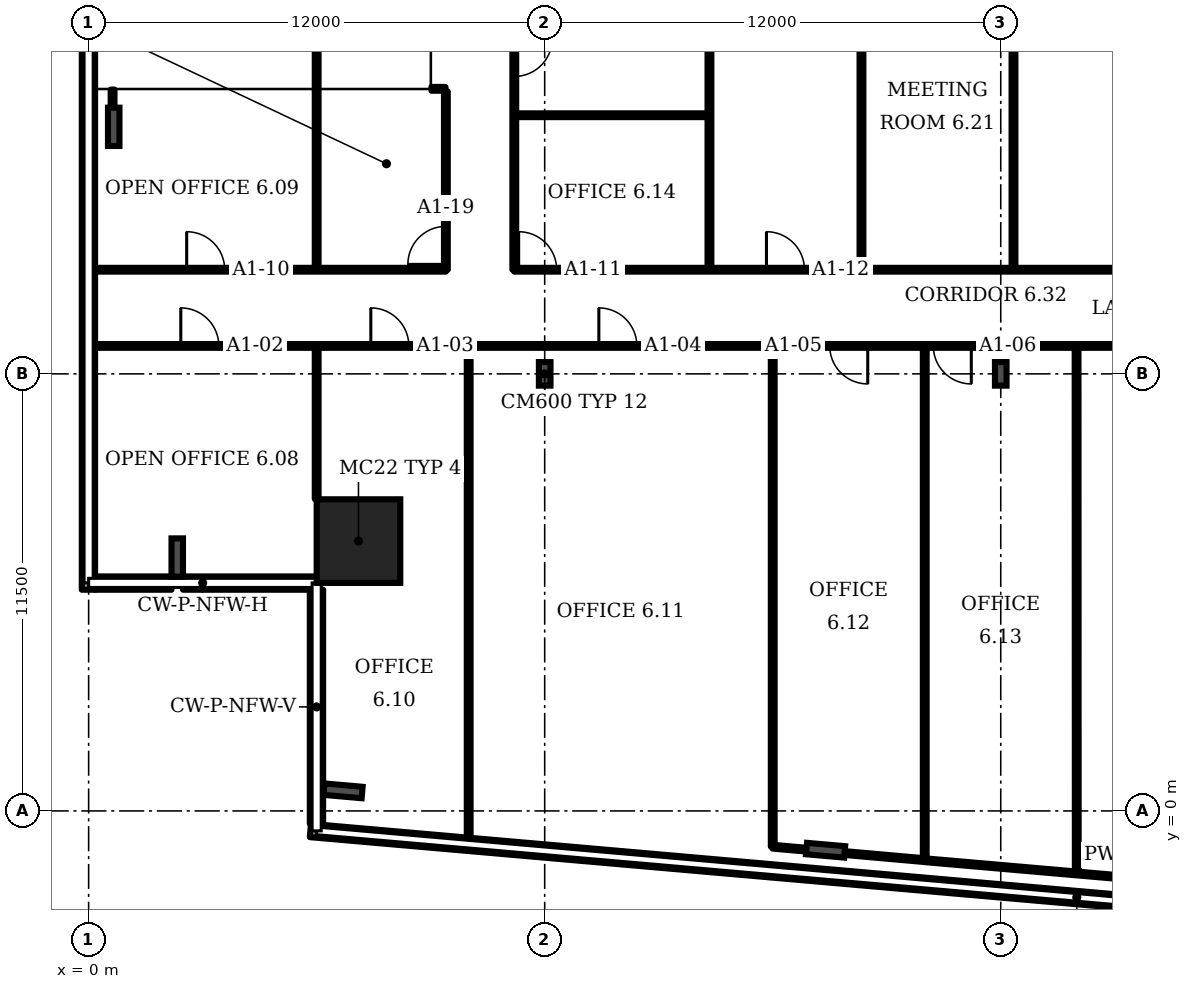
"""IFC4 building model, lengths in metres.
Left out: names, types, materials, properties, quantities, classifications, styles, units other than length and angle.
Written with IfcOpenShell. Run it as: python <this file> out.ifc"""

import sys

from ifc_helpers import new_model, si_unit, direction, frame, frame_2d, origin, origin_2d, place, context, subcontext, project, spatial, rectangle, i_section, extrude, element, fill, save


model = new_model("IFC4")
c1 = context("Model", 3, precision=1e-05, world=origin(), true_north=direction((0.0, 1.0)))
c2 = subcontext(c1, "Body", "Model", "MODEL_VIEW")
j1 = project(units=[si_unit("LENGTHUNIT", "METRE"), si_unit("PLANEANGLEUNIT", "RADIAN")], contexts=[c1])
p1 = place(None, origin())
s1 = spatial("IfcSite", under=j1, at=p1, CompositionType="ELEMENT")
p2 = place(p1, origin())
s2 = spatial("IfcBuilding", under=s1, at=p2, CompositionType="ELEMENT")
p3 = place(p2, frame((0.0, 0.0, 41.5)))
s3 = spatial("IfcBuildingStorey", under=s2, at=p3, CompositionType="ELEMENT", Elevation=41.5)
p4 = place(p3, frame((7.1, 7.1, 0.0), z_axis=(0.0, 0.0, 1.0), x_axis=(1.0, 0.0, 0.0)))
e1 = element("IfcColumn", 1, at=p4, inside=s3, PredefinedType="COLUMN", context=c2, shape_type="SweptSolid", body=[
    extrude(rectangle(XDim=2.2, YDim=2.2, at=origin_2d()), origin(), (0.0, 0.0, 1.0), 3.6),
])
for number, where, z_axis, x_axis in (
    (2, (6.694, 0.529, 0.0), (0.0, 0.0, 1.0), (-0.087, -0.996, 0.0)),
    (3, (19.391, -1.034, 0.0), (0.0, 0.0, 1.0), (-0.087, -0.996, 0.0)),
    (4, (0.66, 18.0, 0.0), (0.0, 0.0, 1.0), (-1.0, 0.0, 0.0)),
    (5, (2.332, 6.667, 0.0), (0.0, 0.0, 1.0), (-1.0, 0.0, 0.0)),
):
    element("IfcColumn", number, at=place(p3, frame(where, z_axis=z_axis, x_axis=x_axis)), inside=s3, PredefinedType="COLUMN", context=c2, shape_type="SweptSolid", body=[
        extrude(i_section(OverallWidth=0.302, OverallDepth=1.008, WebThickness=0.021, FlangeThickness=0.04, FilletRadius=0.03, at=origin_2d()), origin(), (0.0, 0.0, 1.0), 3.6),
    ])
for number, where, z_axis, x_axis in (
    (6, (12.0, 11.5, 0.0), (0.0, 0.0, 1.0), (1.0, 0.0, 0.0)),
    (7, (24.0, 11.5, 0.0), (0.0, 0.0, 1.0), (1.0, 0.0, 0.0)),
):
    element("IfcColumn", number, at=place(p3, frame(where, z_axis=z_axis, x_axis=x_axis)), inside=s3, PredefinedType="COLUMN", context=c2, shape_type="SweptSolid", body=[
        extrude(i_section(OverallWidth=0.305, OverallDepth=0.62, WebThickness=0.021, FlangeThickness=0.04, FilletRadius=0.027, at=origin_2d()), origin(), (0.0, 0.0, 1.0), 3.6),
    ])
p5 = place(p3, frame((5.835, -0.516, 0.0), z_axis=(0.0, 0.0, 1.0), x_axis=(0.996195, -0.087152, 0.0)))
e8 = element("IfcWall", 8, at=p5, inside=s3, PredefinedType="SOLIDWALL", context=c2, shape_type="SweptSolid", body=[
    extrude(rectangle(XDim=40.333, YDim=0.35, at=frame_2d((20.167, 0.0))), origin(), (0.0, 0.0, 1.0), 1.0),
])
p6 = place(p3, frame((-0.005, 41.83, 0.0), z_axis=(0.0, 0.0, 1.0), x_axis=(0.0, -1.0, 0.0)))
e9 = element("IfcWall", 9, at=p6, inside=s3, PredefinedType="SOLIDWALL", context=c2, shape_type="SweptSolid", body=[
    extrude(rectangle(XDim=36.01, YDim=0.35, at=frame_2d((18.005, 0.0))), origin(), (0.0, 0.0, 1.0), 1.0),
])
p7 = place(p3, frame((0.17, 5.995, 0.0), z_axis=(0.0, 0.0, 1.0), x_axis=(1.0, 0.0, 0.0)))
e10 = element("IfcWall", 10, at=p7, inside=s3, PredefinedType="SOLIDWALL", context=c2, shape_type="SweptSolid", body=[
    extrude(rectangle(XDim=2.011, YDim=0.35, at=frame_2d((1.005, 0.0))), origin(), (0.0, 0.0, 1.0), 1.0),
])
p8 = place(p3, frame((2.483, 5.995, 0.0), z_axis=(0.0, 0.0, 1.0), x_axis=(1.0, 0.0, 0.0)))
e11 = element("IfcWall", 11, at=p8, inside=s3, PredefinedType="SOLIDWALL", context=c2, shape_type="SweptSolid", body=[
    extrude(rectangle(XDim=3.517, YDim=0.35, at=frame_2d((1.759, 0.0))), origin(), (0.0, 0.0, 1.0), 1.0),
])
p9 = place(p3, frame((5.995, 5.82, 0.0), z_axis=(0.0, 0.0, 1.0), x_axis=(0.0, -1.0, 0.0)))
e12 = element("IfcWall", 12, at=p9, inside=s3, PredefinedType="SOLIDWALL", context=c2, shape_type="SweptSolid", body=[
    extrude(rectangle(XDim=6.161, YDim=0.35, at=frame_2d((3.081, 0.0))), origin(), (0.0, 0.0, 1.0), 1.0),
])
p10 = place(p3, frame((0.02, 12.235, 0.0), z_axis=(0.0, 0.0, 1.0), x_axis=(1.0, 0.0, 0.0)))
e13 = element("IfcWall", 13, at=p10, inside=s3, PredefinedType="PARTITIONING", context=c2, shape_type="SweptSolid", body=[
    extrude(rectangle(XDim=38.46, YDim=0.1, at=frame_2d((19.23, 0.0))), origin(), (0.0, 0.0, 1.0), 3.2),
])
p11 = place(p10, frame((2.405, 0.0, 0.0)))
e14 = element("IfcOpeningElement", 14, at=p11, cuts=e13, PredefinedType="OPENING", context=c2, shape_type="SweptSolid", body=[
    extrude(rectangle(XDim=1.0, YDim=2.1, at=frame_2d((0.5, 1.05))), frame((0.0, 0.06, 0.0), z_axis=(0.0, -1.0, 0.0), x_axis=(1.0, 0.0, 0.0)), (0.0, 0.0, 1.0), 0.12),
])
p12 = place(p10, frame((7.405, 0.0, 0.0)))
e15 = element("IfcOpeningElement", 15, at=p12, cuts=e13, PredefinedType="OPENING", context=c2, shape_type="SweptSolid", body=[
    extrude(rectangle(XDim=1.0, YDim=2.1, at=frame_2d((0.5, 1.05))), frame((0.0, 0.06, 0.0), z_axis=(0.0, -1.0, 0.0), x_axis=(1.0, 0.0, 0.0)), (0.0, 0.0, 1.0), 0.12),
])
p13 = place(p10, frame((13.405, 0.0, 0.0)))
e16 = element("IfcOpeningElement", 16, at=p13, cuts=e13, PredefinedType="OPENING", context=c2, shape_type="SweptSolid", body=[
    extrude(rectangle(XDim=1.0, YDim=2.1, at=frame_2d((0.5, 1.05))), frame((0.0, 0.06, 0.0), z_axis=(0.0, -1.0, 0.0), x_axis=(1.0, 0.0, 0.0)), (0.0, 0.0, 1.0), 0.12),
])
p14 = place(p10, frame((19.48, 0.0, 0.0)))
e17 = element("IfcOpeningElement", 17, at=p14, cuts=e13, PredefinedType="OPENING", context=c2, shape_type="SweptSolid", body=[
    extrude(rectangle(XDim=1.0, YDim=2.1, at=frame_2d((0.5, 1.05))), frame((0.0, 0.06, 0.0), z_axis=(0.0, -1.0, 0.0), x_axis=(1.0, 0.0, 0.0)), (0.0, 0.0, 1.0), 0.12),
])
p15 = place(p10, frame((22.205, 0.0, 0.0)))
e18 = element("IfcOpeningElement", 18, at=p15, cuts=e13, PredefinedType="OPENING", context=c2, shape_type="SweptSolid", body=[
    extrude(rectangle(XDim=1.0, YDim=2.1, at=frame_2d((0.5, 1.05))), frame((0.0, 0.06, 0.0), z_axis=(0.0, -1.0, 0.0), x_axis=(1.0, 0.0, 0.0)), (0.0, 0.0, 1.0), 0.12),
])
p16 = place(p10, frame((34.2, 0.0, 0.0)))
e19 = element("IfcOpeningElement", 19, at=p16, cuts=e13, PredefinedType="OPENING", context=c2, shape_type="SweptSolid", body=[
    extrude(rectangle(XDim=1.0, YDim=2.1, at=frame_2d((0.5, 1.05))), frame((0.0, 0.06, 0.0), z_axis=(0.0, -1.0, 0.0), x_axis=(1.0, 0.0, 0.0)), (0.0, 0.0, 1.0), 0.12),
])
p17 = place(p3, frame((0.02, 14.24, 0.0), z_axis=(0.0, 0.0, 1.0), x_axis=(1.0, 0.0, 0.0)))
e20 = element("IfcWall", 20, at=p17, inside=s3, PredefinedType="PARTITIONING", context=c2, shape_type="SweptSolid", body=[
    extrude(rectangle(XDim=9.38, YDim=0.1, at=frame_2d((4.69, 0.0))), origin(), (0.0, 0.0, 1.0), 3.2),
])
p18 = place(p17, frame((2.56, 0.0, 0.0)))
e21 = element("IfcOpeningElement", 21, at=p18, cuts=e20, PredefinedType="OPENING", context=c2, shape_type="SweptSolid", body=[
    extrude(rectangle(XDim=1.0, YDim=2.1, at=frame_2d((0.5, 1.05))), frame((0.0, 0.06, 0.0), z_axis=(0.0, -1.0, 0.0), x_axis=(1.0, 0.0, 0.0)), (0.0, 0.0, 1.0), 0.12),
])
p19 = place(p3, frame((0.63, 17.5, 0.0), z_axis=(0.0, 0.0, 1.0), x_axis=(0.0, 1.0, 0.0)))
e22 = element("IfcWall", 22, at=p19, inside=s3, PredefinedType="PARTITIONING", context=c2, shape_type="SweptSolid", body=[
    extrude(rectangle(XDim=1.48, YDim=0.1, at=frame_2d((0.74, 0.0))), origin(), (0.0, 0.0, 1.0), 2.58),
])
p20 = place(p3, frame((6.0, 8.21, 0.0), z_axis=(0.0, 0.0, 1.0), x_axis=(0.0, 1.0, 0.0)))
e23 = element("IfcWall", 23, at=p20, inside=s3, PredefinedType="PARTITIONING", context=c2, shape_type="SweptSolid", body=[
    extrude(rectangle(XDim=4.025, YDim=0.1, at=frame_2d((2.013, 0.0))), origin(), (0.0, 0.0, 1.0), 3.2),
])
p21 = place(p3, frame((6.0, 14.24, 0.0), z_axis=(0.0, 0.0, 1.0), x_axis=(0.0, 1.0, 0.0)))
e24 = element("IfcWall", 24, at=p21, inside=s3, PredefinedType="PARTITIONING", context=c2, shape_type="SweptSolid", body=[
    extrude(rectangle(XDim=6.085, YDim=0.1, at=frame_2d((3.042, 0.0))), origin(), (0.0, 0.0, 1.0), 3.2),
])
p22 = place(p3, frame((9.02, 19.0, 0.0), z_axis=(0.0, 0.0, 1.0), x_axis=(1.0, 0.0, 0.0)))
e25 = element("IfcWall", 25, at=p22, inside=s3, PredefinedType="PARTITIONING", context=c2, shape_type="SweptSolid", body=[
    extrude(rectangle(XDim=0.37, YDim=0.1, at=frame_2d((0.185, 0.0))), origin(), (0.0, 0.0, 1.0), 3.2),
])
p23 = place(p3, frame((9.4, 14.24, 0.0), z_axis=(0.0, 0.0, 1.0), x_axis=(0.0, 1.0, 0.0)))
e26 = element("IfcWall", 26, at=p23, inside=s3, PredefinedType="PARTITIONING", context=c2, shape_type="SweptSolid", body=[
    extrude(rectangle(XDim=4.69, YDim=0.1, at=frame_2d((2.345, 0.0))), origin(), (0.0, 0.0, 1.0), 3.2),
])
p24 = place(p23, frame((0.14, 0.0, 0.0)))
e27 = element("IfcOpeningElement", 27, at=p24, cuts=e26, PredefinedType="OPENING", context=c2, shape_type="SweptSolid", body=[
    extrude(rectangle(XDim=1.0, YDim=2.1, at=frame_2d((0.5, 1.05))), frame((0.0, 0.06, 0.0), z_axis=(0.0, -1.0, 0.0), x_axis=(1.0, 0.0, 0.0)), (0.0, 0.0, 1.0), 0.12),
])
p25 = place(p3, frame((10.0, -0.855, 0.0), z_axis=(0.0, 0.0, 1.0), x_axis=(0.0, 1.0, 0.0)))
e28 = element("IfcWall", 28, at=p25, inside=s3, PredefinedType="PARTITIONING", context=c2, shape_type="SweptSolid", body=[
    extrude(rectangle(XDim=13.09, YDim=0.1, at=frame_2d((6.545, 0.0))), origin(), (0.0, 0.0, 1.0), 3.2),
])
p26 = place(p3, frame((11.2, 14.24, 0.0), z_axis=(0.0, 0.0, 1.0), x_axis=(0.0, 1.0, 0.0)))
e29 = element("IfcWall", 29, at=p26, inside=s3, PredefinedType="PARTITIONING", context=c2, shape_type="SweptSolid", body=[
    extrude(rectangle(XDim=7.11, YDim=0.1, at=frame_2d((3.555, 0.0))), origin(), (0.0, 0.0, 1.0), 3.2),
])
p27 = place(p26, frame((5.085, 0.0, 0.0)))
e30 = element("IfcOpeningElement", 30, at=p27, cuts=e29, PredefinedType="OPENING", context=c2, shape_type="SweptSolid", body=[
    extrude(rectangle(XDim=1.0, YDim=2.1, at=frame_2d((0.5, 1.05))), frame((0.0, 0.06, 0.0), z_axis=(0.0, -1.0, 0.0), x_axis=(1.0, 0.0, 0.0)), (0.0, 0.0, 1.0), 0.12),
])
p28 = place(p3, frame((11.2, 14.24, 0.0), z_axis=(0.0, 0.0, 1.0), x_axis=(1.0, 0.0, 0.0)))
e31 = element("IfcWall", 31, at=p28, inside=s3, PredefinedType="PARTITIONING", context=c2, shape_type="SweptSolid", body=[
    extrude(rectangle(XDim=51.635, YDim=0.1, at=frame_2d((25.817, 0.0))), origin(), (0.0, 0.0, 1.0), 3.2),
])
p29 = place(p28, frame((0.115, 0.0, 0.0)))
e32 = element("IfcOpeningElement", 32, at=p29, cuts=e31, PredefinedType="OPENING", context=c2, shape_type="SweptSolid", body=[
    extrude(rectangle(XDim=1.0, YDim=2.1, at=frame_2d((0.5, 1.05))), frame((0.0, 0.06, 0.0), z_axis=(0.0, -1.0, 0.0), x_axis=(1.0, 0.0, 0.0)), (0.0, 0.0, 1.0), 0.12),
])
p30 = place(p28, frame((6.635, 0.0, 0.0)))
e33 = element("IfcOpeningElement", 33, at=p30, cuts=e31, PredefinedType="OPENING", context=c2, shape_type="SweptSolid", body=[
    extrude(rectangle(XDim=1.0, YDim=2.1, at=frame_2d((0.5, 1.05))), frame((0.0, 0.06, 0.0), z_axis=(0.0, -1.0, 0.0), x_axis=(1.0, 0.0, 0.0)), (0.0, 0.0, 1.0), 0.12),
])
p31 = place(p28, frame((22.7, 0.0, 0.0)))
e34 = element("IfcOpeningElement", 34, at=p31, cuts=e31, PredefinedType="OPENING", context=c2, shape_type="SweptSolid", body=[
    extrude(rectangle(XDim=1.0, YDim=2.1, at=frame_2d((0.5, 1.05))), frame((0.0, 0.06, 0.0), z_axis=(0.0, -1.0, 0.0), x_axis=(1.0, 0.0, 0.0)), (0.0, 0.0, 1.0), 0.12),
])
p32 = place(p28, frame((27.865, 0.0, 0.0)))
e35 = element("IfcOpeningElement", 35, at=p32, cuts=e31, PredefinedType="OPENING", context=c2, shape_type="SweptSolid", body=[
    extrude(rectangle(XDim=1.0, YDim=2.1, at=frame_2d((0.5, 1.05))), frame((0.0, 0.06, 0.0), z_axis=(0.0, -1.0, 0.0), x_axis=(1.0, 0.0, 0.0)), (0.0, 0.0, 1.0), 0.12),
])
p33 = place(p28, frame((34.065, 0.0, 0.0)))
e36 = element("IfcOpeningElement", 36, at=p33, cuts=e31, PredefinedType="OPENING", context=c2, shape_type="SweptSolid", body=[
    extrude(rectangle(XDim=1.8, YDim=2.1, at=frame_2d((0.9, 1.05))), frame((0.0, 0.06, 0.0), z_axis=(0.0, -1.0, 0.0), x_axis=(1.0, 0.0, 0.0)), (0.0, 0.0, 1.0), 0.12),
])
p34 = place(p28, frame((41.765, 0.0, 0.0)))
e37 = element("IfcOpeningElement", 37, at=p34, cuts=e31, PredefinedType="OPENING", context=c2, shape_type="SweptSolid", body=[
    extrude(rectangle(XDim=1.8, YDim=2.1, at=frame_2d((0.9, 1.05))), frame((0.0, 0.06, 0.0), z_axis=(0.0, -1.0, 0.0), x_axis=(1.0, 0.0, 0.0)), (0.0, 0.0, 1.0), 0.12),
])
p35 = place(p3, frame((11.2, 18.305, 0.0), z_axis=(0.0, 0.0, 1.0), x_axis=(1.0, 0.0, 0.0)))
e38 = element("IfcWall", 38, at=p35, inside=s3, PredefinedType="PARTITIONING", context=c2, shape_type="SweptSolid", body=[
    extrude(rectangle(XDim=5.135, YDim=0.1, at=frame_2d((2.567, 0.0))), origin(), (0.0, 0.0, 1.0), 3.2),
])
p36 = place(p3, frame((16.335, 14.24, 0.0), z_axis=(0.0, 0.0, 1.0), x_axis=(0.0, 1.0, 0.0)))
e39 = element("IfcWall", 39, at=p36, inside=s3, PredefinedType="PARTITIONING", context=c2, shape_type="SweptSolid", body=[
    extrude(rectangle(XDim=16.26, YDim=0.1, at=frame_2d((8.13, 0.0))), origin(), (0.0, 0.0, 1.0), 3.2),
])
p37 = place(p3, frame((18.0, -0.94, 0.0), z_axis=(0.0, 0.0, 1.0), x_axis=(0.0, 1.0, 0.0)))
e40 = element("IfcWall", 40, at=p37, inside=s3, PredefinedType="PARTITIONING", context=c2, shape_type="SweptSolid", body=[
    extrude(rectangle(XDim=13.175, YDim=0.1, at=frame_2d((6.587, 0.0))), origin(), (0.0, 0.0, 1.0), 3.2),
])
p38 = place(p3, frame((20.335, 14.24, 0.0), z_axis=(0.0, 0.0, 1.0), x_axis=(0.0, 1.0, 0.0)))
e41 = element("IfcWall", 41, at=p38, inside=s3, PredefinedType="PARTITIONING", context=c2, shape_type="SweptSolid", body=[
    extrude(rectangle(XDim=16.26, YDim=0.1, at=frame_2d((8.13, 0.0))), origin(), (0.0, 0.0, 1.0), 3.2),
])
p39 = place(p3, frame((22.0, -1.295, 0.0), z_axis=(0.0, 0.0, 1.0), x_axis=(-0.99611, 0.088069, 0.0)))
e42 = element("IfcWall", 42, at=p39, inside=s3, PredefinedType="PARTITIONING", context=c2, shape_type="SweptSolid", body=[
    extrude(rectangle(XDim=4.017, YDim=0.1, at=frame_2d((2.008, 0.0))), origin(), (0.0, 0.0, 1.0), 2.58),
])
p40 = place(p3, frame((22.0, -1.295, 0.0), z_axis=(0.0, 0.0, 1.0), x_axis=(0.0, 1.0, 0.0)))
e43 = element("IfcWall", 43, at=p40, inside=s3, PredefinedType="PARTITIONING", context=c2, shape_type="SweptSolid", body=[
    extrude(rectangle(XDim=13.53, YDim=0.1, at=frame_2d((6.765, 0.0))), origin(), (0.0, 0.0, 1.0), 3.2),
])
p41 = place(p3, frame((24.335, 14.24, 0.0), z_axis=(0.0, 0.0, 1.0), x_axis=(0.0, 1.0, 0.0)))
e44 = element("IfcWall", 44, at=p41, inside=s3, PredefinedType="PARTITIONING", context=c2, shape_type="SweptSolid", body=[
    extrude(rectangle(XDim=16.25, YDim=0.1, at=frame_2d((8.125, 0.0))), origin(), (0.0, 0.0, 1.0), 3.2),
])
p42 = place(p3, frame((26.0, -1.645, 0.0), z_axis=(0.0, 0.0, 1.0), x_axis=(-0.000352, 1.000004, 0.0)))
e45 = element("IfcWall", 45, at=p42, inside=s3, PredefinedType="PARTITIONING", context=c2, shape_type="SweptSolid", body=[
    extrude(rectangle(XDim=13.88, YDim=0.1, at=frame_2d((6.94, 0.0))), origin(), (0.0, 0.0, 1.0), 3.2),
])
p43 = place(p3, frame((32.665, -2.225, 0.0), z_axis=(0.0, 0.0, 1.0), x_axis=(-0.99623, 0.086702, 0.0)))
e46 = element("IfcWall", 46, at=p43, inside=s3, PredefinedType="PARTITIONING", context=c2, shape_type="SweptSolid", body=[
    extrude(rectangle(XDim=10.706, YDim=0.1, at=frame_2d((5.353, 0.0))), origin(), (0.0, 0.0, 1.0), 2.58),
])
p44 = place(p11, origin())
e47 = element("IfcDoor", 47, at=p44, inside=s3, OperationType="SINGLE_SWING_LEFT", PredefinedType="DOOR", context=c2, shape_type="SweptSolid", body=[
    extrude(rectangle(XDim=1.0, YDim=2.1, at=frame_2d((0.5, 1.05))), frame((0.0, 0.025, 0.0), z_axis=(0.0, -1.0, 0.0), x_axis=(1.0, 0.0, 0.0)), (0.0, 0.0, 1.0), 0.05),
])
fill(e14, e47)
p45 = place(p12, origin())
e48 = element("IfcDoor", 48, at=p45, inside=s3, OperationType="SINGLE_SWING_LEFT", PredefinedType="DOOR", context=c2, shape_type="SweptSolid", body=[
    extrude(rectangle(XDim=1.0, YDim=2.1, at=frame_2d((0.5, 1.05))), frame((0.0, 0.025, 0.0), z_axis=(0.0, -1.0, 0.0), x_axis=(1.0, 0.0, 0.0)), (0.0, 0.0, 1.0), 0.05),
])
fill(e15, e48)
p46 = place(p13, origin())
e49 = element("IfcDoor", 49, at=p46, inside=s3, OperationType="SINGLE_SWING_LEFT", PredefinedType="DOOR", context=c2, shape_type="SweptSolid", body=[
    extrude(rectangle(XDim=1.0, YDim=2.1, at=frame_2d((0.5, 1.05))), frame((0.0, 0.025, 0.0), z_axis=(0.0, -1.0, 0.0), x_axis=(1.0, 0.0, 0.0)), (0.0, 0.0, 1.0), 0.05),
])
fill(e16, e49)
p47 = place(p14, origin())
e50 = element("IfcDoor", 50, at=p47, inside=s3, OperationType="SINGLE_SWING_RIGHT", PredefinedType="DOOR", context=c2, shape_type="SweptSolid", body=[
    extrude(rectangle(XDim=1.0, YDim=2.1, at=frame_2d((0.5, 1.05))), frame((0.0, 0.025, 0.0), z_axis=(0.0, -1.0, 0.0), x_axis=(1.0, 0.0, 0.0)), (0.0, 0.0, 1.0), 0.05),
])
fill(e17, e50)
p48 = place(p15, origin())
e51 = element("IfcDoor", 51, at=p48, inside=s3, OperationType="SINGLE_SWING_RIGHT", PredefinedType="DOOR", context=c2, shape_type="SweptSolid", body=[
    extrude(rectangle(XDim=1.0, YDim=2.1, at=frame_2d((0.5, 1.05))), frame((0.0, 0.025, 0.0), z_axis=(0.0, -1.0, 0.0), x_axis=(1.0, 0.0, 0.0)), (0.0, 0.0, 1.0), 0.05),
])
fill(e18, e51)
p49 = place(p18, origin())
e52 = element("IfcDoor", 52, at=p49, inside=s3, OperationType="SINGLE_SWING_LEFT", PredefinedType="DOOR", context=c2, shape_type="SweptSolid", body=[
    extrude(rectangle(XDim=1.0, YDim=2.1, at=frame_2d((0.5, 1.05))), frame((0.0, 0.025, 0.0), z_axis=(0.0, -1.0, 0.0), x_axis=(1.0, 0.0, 0.0)), (0.0, 0.0, 1.0), 0.05),
])
fill(e21, e52)
p50 = place(p29, origin())
e53 = element("IfcDoor", 53, at=p50, inside=s3, OperationType="SINGLE_SWING_LEFT", PredefinedType="DOOR", context=c2, shape_type="SweptSolid", body=[
    extrude(rectangle(XDim=1.0, YDim=2.1, at=frame_2d((0.5, 1.05))), frame((0.0, 0.025, 0.0), z_axis=(0.0, -1.0, 0.0), x_axis=(1.0, 0.0, 0.0)), (0.0, 0.0, 1.0), 0.05),
])
fill(e32, e53)
p51 = place(p30, origin())
e54 = element("IfcDoor", 54, at=p51, inside=s3, OperationType="SINGLE_SWING_LEFT", PredefinedType="DOOR", context=c2, shape_type="SweptSolid", body=[
    extrude(rectangle(XDim=1.0, YDim=2.1, at=frame_2d((0.5, 1.05))), frame((0.0, 0.025, 0.0), z_axis=(0.0, -1.0, 0.0), x_axis=(1.0, 0.0, 0.0)), (0.0, 0.0, 1.0), 0.05),
])
fill(e33, e54)
p52 = place(p24, origin())
e55 = element("IfcDoor", 55, at=p52, inside=s3, OperationType="SINGLE_SWING_LEFT", PredefinedType="DOOR", context=c2, shape_type="SweptSolid", body=[
    extrude(rectangle(XDim=1.0, YDim=2.1, at=frame_2d((0.5, 1.05))), frame((0.0, 0.025, 0.0), z_axis=(0.0, -1.0, 0.0), x_axis=(1.0, 0.0, 0.0)), (0.0, 0.0, 1.0), 0.05),
])
fill(e27, e55)
p53 = place(p27, origin())
e56 = element("IfcDoor", 56, at=p53, inside=s3, OperationType="SINGLE_SWING_RIGHT", PredefinedType="DOOR", context=c2, shape_type="SweptSolid", body=[
    extrude(rectangle(XDim=1.0, YDim=2.1, at=frame_2d((0.5, 1.05))), frame((0.0, 0.025, 0.0), z_axis=(0.0, -1.0, 0.0), x_axis=(1.0, 0.0, 0.0)), (0.0, 0.0, 1.0), 0.05),
])
fill(e30, e56)
save(model, sys.argv[1])
